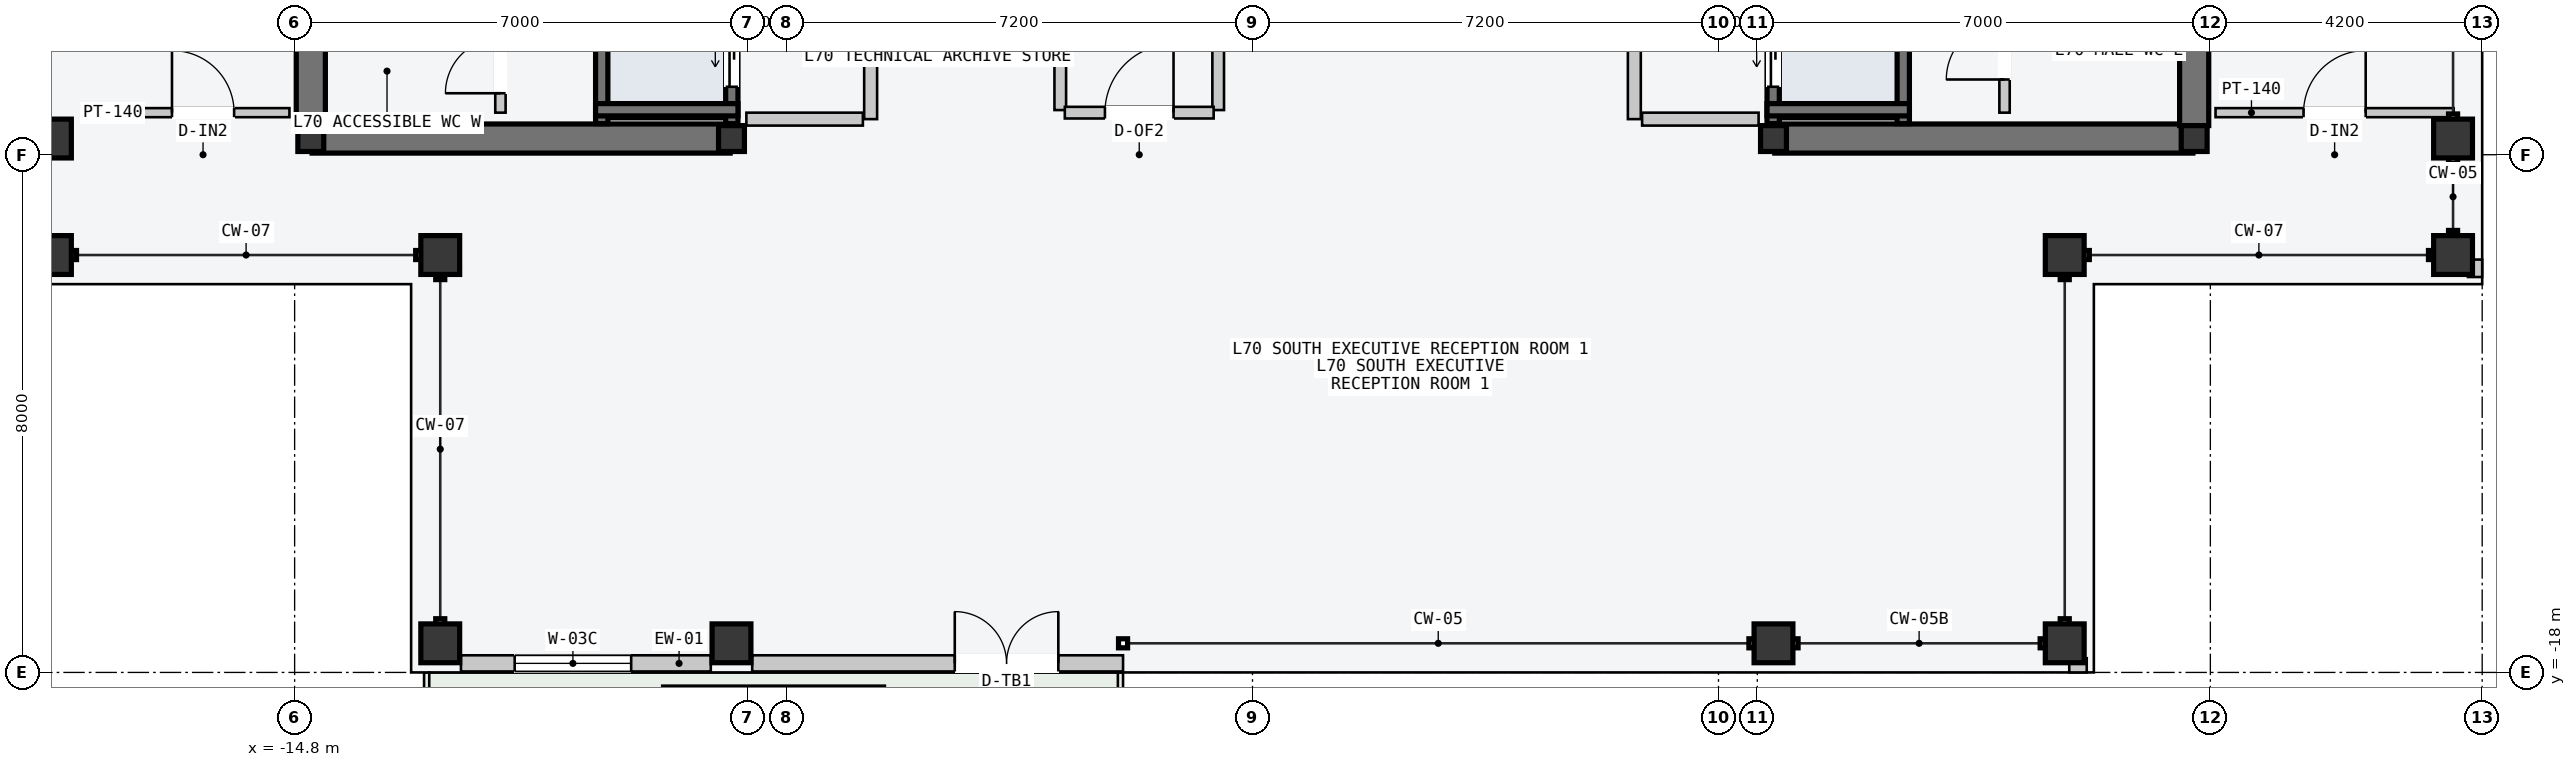
"""IFC4 building model, lengths in metres.
Left out: names, types, materials, properties, quantities, classifications, styles, units other than length and angle.
Written with IfcOpenShell. Run it as: python <this file> out.ifc"""

import sys

from ifc_helpers import new_model, si_unit, direction, frame, frame_2d, origin, origin_2d, place, context, subcontext, project, spatial, rectangle, hollow_rectangle, i_section, extrude, element, fill, save


model = new_model("IFC4")
c1 = context("Model", 3, precision=1e-05, world=origin(), true_north=direction((0.0, 1.0)))
c2 = subcontext(c1, "Body", "Model", "MODEL_VIEW")
j1 = project(units=[si_unit("LENGTHUNIT", "METRE"), si_unit("PLANEANGLEUNIT", "RADIAN")], contexts=[c1])
p1 = place(None, origin())
s1 = spatial("IfcSite", under=j1, at=p1, CompositionType="ELEMENT")
p2 = place(p1, origin())
s2 = spatial("IfcBuilding", under=s1, at=p2, CompositionType="ELEMENT")
p3 = place(p2, frame((0.0, 0.0, 265.2)))
s3 = spatial("IfcBuildingStorey", under=s2, at=p3, CompositionType="ELEMENT", Elevation=265.2)
p4 = place(p3, frame((-14.53, -9.75, -0.2), z_axis=(0.0, 0.0, 1.0), x_axis=(1.0, 0.0, 0.0)))
e1 = element("IfcWall", 1, at=p4, inside=s3, PredefinedType="SHEAR", context=c2, shape_type="SweptSolid", body=[
    extrude(rectangle(XDim=6.46, YDim=0.45, at=frame_2d((3.23, 0.0))), origin(), (0.0, 0.0, 1.0), 3.6),
])
p5 = place(p3, frame((-14.55, -9.55, -0.2), z_axis=(0.0, 0.0, 1.0), x_axis=(0.0, 1.0, 0.0)))
e2 = element("IfcWall", 2, at=p5, inside=s3, PredefinedType="SHEAR", context=c2, shape_type="SweptSolid", body=[
    extrude(rectangle(XDim=9.35, YDim=0.45, at=frame_2d((4.675, 0.0))), origin(), (0.0, 0.0, 1.0), 3.6),
])
p6 = place(p3, frame((8.07, -9.75, -0.2), z_axis=(0.0, 0.0, 1.0), x_axis=(1.0, 0.0, 0.0)))
e3 = element("IfcWall", 3, at=p6, inside=s3, PredefinedType="SHEAR", context=c2, shape_type="SweptSolid", body=[
    extrude(rectangle(XDim=6.46, YDim=0.45, at=frame_2d((3.23, 0.0))), origin(), (0.0, 0.0, 1.0), 3.6),
])
p7 = place(p3, frame((14.55, -9.55, -0.2), z_axis=(0.0, 0.0, 1.0), x_axis=(0.0, 1.0, 0.0)))
e4 = element("IfcWall", 4, at=p7, inside=s3, PredefinedType="SHEAR", context=c2, shape_type="SweptSolid", body=[
    extrude(rectangle(XDim=9.35, YDim=0.45, at=frame_2d((4.675, 0.0))), origin(), (0.0, 0.0, 1.0), 3.6),
])
for number, where, z_axis, x_axis in (
    (5, (-14.55, -9.75, 0.0), (0.0, 0.0, 1.0), (1.0, 0.0, 0.0)),
    (6, (-8.05, -9.75, 0.0), (0.0, 0.0, 1.0), (1.0, 0.0, 0.0)),
    (7, (8.05, -9.75, 0.0), (0.0, 0.0, 1.0), (1.0, 0.0, 0.0)),
    (8, (14.55, -9.75, 0.0), (0.0, 0.0, 1.0), (1.0, 0.0, 0.0)),
):
    element("IfcColumn", number, at=place(p3, frame(where, z_axis=z_axis, x_axis=x_axis)), inside=s3, PredefinedType="COLUMN", context=c2, shape_type="SweptSolid", body=[
        extrude(i_section(OverallWidth=0.4, OverallDepth=0.4, WebThickness=0.013, FlangeThickness=0.021, at=origin_2d()), origin(), (0.0, 0.0, 1.0), 3.6),
    ])
for number, where, z_axis, x_axis in (
    (9, (-12.55, -17.55, 0.0), (0.0, 0.0, 1.0), (1.0, 0.0, 0.0)),
    (10, (-8.05, -17.55, 0.0), (0.0, 0.0, 1.0), (1.0, 0.0, 0.0)),
    (11, (8.05, -17.55, 0.0), (0.0, 0.0, 1.0), (1.0, 0.0, 0.0)),
    (12, (12.55, -17.55, 0.0), (0.0, 0.0, 1.0), (1.0, 0.0, 0.0)),
    (13, (-18.55, -11.55, 0.0), (0.0, 0.0, 1.0), (0.0, 1.0, 0.0)),
    (14, (-18.55, -9.75, 0.0), (0.0, 0.0, 1.0), (0.0, 1.0, 0.0)),
    (15, (18.55, -11.55, 0.0), (0.0, 0.0, 1.0), (0.0, 1.0, 0.0)),
    (16, (18.55, -9.75, 0.0), (0.0, 0.0, 1.0), (0.0, 1.0, 0.0)),
    (17, (12.55, -11.55, 0.0), (0.0, 0.0, 1.0), (1.0, 0.0, 0.0)),
    (18, (-12.55, -11.55, 0.0), (0.0, 0.0, 1.0), (1.0, 0.0, 0.0)),
):
    element("IfcColumn", number, at=place(p3, frame(where, z_axis=z_axis, x_axis=x_axis)), inside=s3, PredefinedType="COLUMN", context=c2, shape_type="SweptSolid", body=[
        extrude(hollow_rectangle(XDim=0.6, YDim=0.6, WallThickness=0.025, at=origin_2d()), origin(), (0.0, 0.0, 1.0), 3.6),
    ])
p8 = place(p3, frame((-12.23, -17.86, 0.0), z_axis=(0.0, 0.0, 1.0), x_axis=(1.0, 0.0, 0.0)))
e19 = element("IfcWall", 19, at=p8, inside=s3, PredefinedType="STANDARD", context=c2, shape_type="SweptSolid", body=[
    extrude(rectangle(XDim=3.86, YDim=0.25, at=frame_2d((1.93, 0.0))), origin(), (0.0, 0.0, 1.0), 3.4),
])
p9 = place(p8, frame((0.83, 0.0, 0.85)))
e20 = element("IfcOpeningElement", 20, at=p9, cuts=e19, PredefinedType="OPENING", context=c2, shape_type="SweptSolid", body=[
    extrude(rectangle(XDim=1.8, YDim=2.05, at=frame_2d((0.9, 1.025))), frame((0.0, 0.135, 0.0), z_axis=(0.0, -1.0, 0.0), x_axis=(1.0, 0.0, 0.0)), (0.0, 0.0, 1.0), 0.27),
])
p10 = place(p3, frame((-7.73, -17.86, 0.0), z_axis=(0.0, 0.0, 1.0), x_axis=(1.0, 0.0, 0.0)))
e21 = element("IfcWall", 21, at=p10, inside=s3, PredefinedType="STANDARD", context=c2, shape_type="SweptSolid", body=[
    extrude(rectangle(XDim=5.73, YDim=0.25, at=frame_2d((2.865, 0.0))), origin(), (0.0, 0.0, 1.0), 3.4),
])
p11 = place(p10, frame((3.13, 0.0, 0.0)))
e22 = element("IfcOpeningElement", 22, at=p11, cuts=e21, PredefinedType="OPENING", context=c2, shape_type="SweptSolid", body=[
    extrude(rectangle(XDim=1.6, YDim=2.2, at=frame_2d((0.8, 1.1))), frame((0.0, 0.135, 0.0), z_axis=(0.0, -1.0, 0.0), x_axis=(1.0, 0.0, 0.0)), (0.0, 0.0, 1.0), 0.27),
])
for number, where, z_axis, x_axis in (
    (23, (12.62, -17.89, 0.0), (0.0, 0.0, 1.0), (1.0, 0.0, 0.0)),
    (24, (18.89, -11.89, 0.0), (0.0, 0.0, 1.0), (0.0, 1.0, 0.0)),
):
    element("IfcWall", number, at=place(p3, frame(where, z_axis=z_axis, x_axis=x_axis)), inside=s3, PredefinedType="PARAPET", context=c2, shape_type="SweptSolid", body=[
        extrude(rectangle(XDim=0.27, YDim=0.22, at=frame_2d((0.135, 0.0))), origin(), (0.0, 0.0, 1.0), 1.2),
    ])
p12 = place(p3, frame((-8.045, -9.52, -0.2), z_axis=(0.0, 0.0, 1.0), x_axis=(0.0, 1.0, 0.0)))
e25 = element("IfcWall", 25, at=p12, inside=s3, PredefinedType="SOLIDWALL", context=c2, shape_type="SweptSolid", body=[
    extrude(rectangle(XDim=2.12, YDim=0.19, at=frame_2d((1.06, 0.0))), origin(), (0.0, 0.0, 1.0), 3.6),
])
p13 = place(p12, frame((0.57, 0.0, 0.2)))
e26 = element("IfcOpeningElement", 26, at=p13, cuts=e25, PredefinedType="OPENING", context=c2, shape_type="SweptSolid", body=[
    extrude(rectangle(XDim=1.1, YDim=2.2, at=frame_2d((0.55, 1.1))), frame((0.0, 0.105, 0.0), z_axis=(0.0, -1.0, 0.0), x_axis=(1.0, 0.0, 0.0)), (0.0, 0.0, 1.0), 0.21),
])
p14 = place(p3, frame((-10.055, -9.52, -0.2), z_axis=(0.0, 0.0, 1.0), x_axis=(0.0, 1.0, 0.0)))
e27 = element("IfcWall", 27, at=p14, inside=s3, PredefinedType="SOLIDWALL", context=c2, shape_type="SweptSolid", body=[
    extrude(rectangle(XDim=2.12, YDim=0.19, at=frame_2d((1.06, 0.0))), origin(), (0.0, 0.0, 1.0), 3.6),
])
p15 = place(p3, frame((-10.15, -9.305, -0.2), z_axis=(0.0, 0.0, 1.0), x_axis=(1.0, 0.0, 0.0)))
e28 = element("IfcWall", 28, at=p15, inside=s3, PredefinedType="SOLIDWALL", context=c2, shape_type="SweptSolid", body=[
    extrude(rectangle(XDim=2.2, YDim=0.19, at=frame_2d((1.1, 0.0))), origin(), (0.0, 0.0, 1.0), 3.6),
])
p16 = place(p3, frame((8.045, -9.52, -0.2), z_axis=(0.0, 0.0, 1.0), x_axis=(0.0, 1.0, 0.0)))
e29 = element("IfcWall", 29, at=p16, inside=s3, PredefinedType="SOLIDWALL", context=c2, shape_type="SweptSolid", body=[
    extrude(rectangle(XDim=2.12, YDim=0.19, at=frame_2d((1.06, 0.0))), origin(), (0.0, 0.0, 1.0), 3.6),
])
p17 = place(p16, frame((0.57, 0.0, 0.2)))
e30 = element("IfcOpeningElement", 30, at=p17, cuts=e29, PredefinedType="OPENING", context=c2, shape_type="SweptSolid", body=[
    extrude(rectangle(XDim=1.1, YDim=2.2, at=frame_2d((0.55, 1.1))), frame((0.0, 0.105, 0.0), z_axis=(0.0, -1.0, 0.0), x_axis=(1.0, 0.0, 0.0)), (0.0, 0.0, 1.0), 0.21),
])
p18 = place(p3, frame((10.055, -9.52, -0.2), z_axis=(0.0, 0.0, 1.0), x_axis=(0.0, 1.0, 0.0)))
e31 = element("IfcWall", 31, at=p18, inside=s3, PredefinedType="SOLIDWALL", context=c2, shape_type="SweptSolid", body=[
    extrude(rectangle(XDim=2.12, YDim=0.19, at=frame_2d((1.06, 0.0))), origin(), (0.0, 0.0, 1.0), 3.6),
])
p19 = place(p3, frame((7.95, -9.305, -0.2), z_axis=(0.0, 0.0, 1.0), x_axis=(1.0, 0.0, 0.0)))
e32 = element("IfcWall", 32, at=p19, inside=s3, PredefinedType="SOLIDWALL", context=c2, shape_type="SweptSolid", body=[
    extrude(rectangle(XDim=2.2, YDim=0.19, at=frame_2d((1.1, 0.0))), origin(), (0.0, 0.0, 1.0), 3.6),
])
p20 = place(p3, frame((-5.9, -9.45, 0.0), z_axis=(0.0, 0.0, 1.0), x_axis=(0.0, 1.0, 0.0)))
e33 = element("IfcWall", 33, at=p20, inside=s3, PredefinedType="PARTITIONING", context=c2, shape_type="SweptSolid", body=[
    extrude(rectangle(XDim=10.5, YDim=0.2, at=frame_2d((5.25, 0.0))), origin(), (0.0, 0.0, 1.0), 3.4),
])
p21 = place(p20, frame((3.9, 0.0, 0.0)))
e34 = element("IfcOpeningElement", 34, at=p21, cuts=e33, PredefinedType="OPENING", context=c2, shape_type="SweptSolid", body=[
    extrude(rectangle(XDim=1.5, YDim=2.2, at=frame_2d((0.75, 1.1))), frame((0.0, 0.11, 0.0), z_axis=(0.0, -1.0, 0.0), x_axis=(1.0, 0.0, 0.0)), (0.0, 0.0, 1.0), 0.22),
])
p22 = place(p3, frame((-6.02, -9.45, 0.0), z_axis=(0.0, 0.0, 1.0), x_axis=(-1.0, 0.0, 0.0)))
e35 = element("IfcWall", 35, at=p22, inside=s3, PredefinedType="PARTITIONING", context=c2, shape_type="SweptSolid", body=[
    extrude(rectangle(XDim=1.8, YDim=0.2, at=frame_2d((0.9, 0.0))), origin(), (0.0, 0.0, 1.0), 3.4),
])
p23 = place(p3, frame((-11.62, -9.35, 0.0), z_axis=(0.0, 0.0, 1.0), x_axis=(0.0, 1.0, 0.0)))
e36 = element("IfcWall", 36, at=p23, inside=s3, PredefinedType="PARTITIONING", context=c2, shape_type="SweptSolid", body=[
    extrude(rectangle(XDim=3.85, YDim=0.16, at=frame_2d((1.925, 0.0))), origin(), (0.0, 0.0, 1.0), 3.4),
])
p24 = place(p23, frame((0.3, 0.0, 0.0)))
e37 = element("IfcOpeningElement", 37, at=p24, cuts=e36, PredefinedType="OPENING", context=c2, shape_type="SweptSolid", body=[
    extrude(rectangle(XDim=0.85, YDim=2.12, at=frame_2d((0.425, 1.06))), frame((0.0, 0.09, 0.0), z_axis=(0.0, -1.0, 0.0), x_axis=(1.0, 0.0, 0.0)), (0.0, 0.0, 1.0), 0.18),
])
p25 = place(p23, frame((1.5, 0.0, 0.0)))
e38 = element("IfcOpeningElement", 38, at=p25, cuts=e36, PredefinedType="OPENING", context=c2, shape_type="SweptSolid", body=[
    extrude(rectangle(XDim=0.85, YDim=2.12, at=frame_2d((0.425, 1.06))), frame((0.0, 0.09, 0.0), z_axis=(0.0, -1.0, 0.0), x_axis=(1.0, 0.0, 0.0)), (0.0, 0.0, 1.0), 0.18),
])
p26 = place(p23, frame((2.7, 0.0, 0.0)))
e39 = element("IfcOpeningElement", 39, at=p26, cuts=e36, PredefinedType="OPENING", context=c2, shape_type="SweptSolid", body=[
    extrude(rectangle(XDim=0.85, YDim=2.12, at=frame_2d((0.425, 1.06))), frame((0.0, 0.09, 0.0), z_axis=(0.0, -1.0, 0.0), x_axis=(1.0, 0.0, 0.0)), (0.0, 0.0, 1.0), 0.18),
])
p27 = place(p3, frame((5.9, -9.45, 0.0), z_axis=(0.0, 0.0, 1.0), x_axis=(0.0, 1.0, 0.0)))
e40 = element("IfcWall", 40, at=p27, inside=s3, PredefinedType="PARTITIONING", context=c2, shape_type="SweptSolid", body=[
    extrude(rectangle(XDim=10.5, YDim=0.2, at=frame_2d((5.25, 0.0))), origin(), (0.0, 0.0, 1.0), 3.4),
])
p28 = place(p27, frame((3.9, 0.0, 0.0)))
e41 = element("IfcOpeningElement", 41, at=p28, cuts=e40, PredefinedType="OPENING", context=c2, shape_type="SweptSolid", body=[
    extrude(rectangle(XDim=1.5, YDim=2.2, at=frame_2d((0.75, 1.1))), frame((0.0, 0.11, 0.0), z_axis=(0.0, -1.0, 0.0), x_axis=(1.0, 0.0, 0.0)), (0.0, 0.0, 1.0), 0.22),
])
p29 = place(p3, frame((6.02, -9.45, 0.0), z_axis=(0.0, 0.0, 1.0), x_axis=(1.0, 0.0, 0.0)))
e42 = element("IfcWall", 42, at=p29, inside=s3, PredefinedType="PARTITIONING", context=c2, shape_type="SweptSolid", body=[
    extrude(rectangle(XDim=1.8, YDim=0.2, at=frame_2d((0.9, 0.0))), origin(), (0.0, 0.0, 1.0), 3.4),
])
p30 = place(p3, frame((11.62, -9.35, 0.0), z_axis=(0.0, 0.0, 1.0), x_axis=(0.0, 1.0, 0.0)))
e43 = element("IfcWall", 43, at=p30, inside=s3, PredefinedType="PARTITIONING", context=c2, shape_type="SweptSolid", body=[
    extrude(rectangle(XDim=3.85, YDim=0.16, at=frame_2d((1.925, 0.0))), origin(), (0.0, 0.0, 1.0), 3.4),
])
p31 = place(p30, frame((0.512, 0.0, 0.0)))
e44 = element("IfcOpeningElement", 44, at=p31, cuts=e43, PredefinedType="OPENING", context=c2, shape_type="SweptSolid", body=[
    extrude(rectangle(XDim=0.9, YDim=2.15, at=frame_2d((0.45, 1.075))), frame((0.0, 0.09, 0.0), z_axis=(0.0, -1.0, 0.0), x_axis=(1.0, 0.0, 0.0)), (0.0, 0.0, 1.0), 0.18),
])
p32 = place(p30, frame((2.438, 0.0, 0.0)))
e45 = element("IfcOpeningElement", 45, at=p32, cuts=e43, PredefinedType="OPENING", context=c2, shape_type="SweptSolid", body=[
    extrude(rectangle(XDim=0.9, YDim=2.15, at=frame_2d((0.45, 1.075))), frame((0.0, 0.09, 0.0), z_axis=(0.0, -1.0, 0.0), x_axis=(1.0, 0.0, 0.0)), (0.0, 0.0, 1.0), 0.18),
])
p33 = place(p3, frame((-2.97, -9.31, 0.0), z_axis=(0.0, 0.0, 1.0), x_axis=(0.0, 1.0, 0.0)))
e46 = element("IfcWall", 46, at=p33, inside=s3, PredefinedType="PARTITIONING", context=c2, shape_type="SweptSolid", body=[
    extrude(rectangle(XDim=3.63, YDim=0.18, at=frame_2d((1.815, 0.0))), origin(), (0.0, 0.0, 1.0), 3.4),
])
p34 = place(p33, frame((1.15, 0.0, 0.0)))
e47 = element("IfcOpeningElement", 47, at=p34, cuts=e46, PredefinedType="OPENING", context=c2, shape_type="SweptSolid", body=[
    extrude(rectangle(XDim=0.96, YDim=2.18, at=frame_2d((0.48, 1.09))), frame((0.0, 0.1, 0.0), z_axis=(0.0, -1.0, 0.0), x_axis=(1.0, 0.0, 0.0)), (0.0, 0.0, 1.0), 0.2),
])
p35 = place(p3, frame((-0.53, -9.31, 0.0), z_axis=(0.0, 0.0, 1.0), x_axis=(0.0, 1.0, 0.0)))
e48 = element("IfcWall", 48, at=p35, inside=s3, PredefinedType="PARTITIONING", context=c2, shape_type="SweptSolid", body=[
    extrude(rectangle(XDim=3.63, YDim=0.18, at=frame_2d((1.815, 0.0))), origin(), (0.0, 0.0, 1.0), 3.4),
])
p36 = place(p35, frame((1.15, 0.0, 0.0)))
e49 = element("IfcOpeningElement", 49, at=p36, cuts=e48, PredefinedType="OPENING", context=c2, shape_type="SweptSolid", body=[
    extrude(rectangle(XDim=0.96, YDim=2.18, at=frame_2d((0.48, 1.09))), frame((0.0, 0.1, 0.0), z_axis=(0.0, -1.0, 0.0), x_axis=(1.0, 0.0, 0.0)), (0.0, 0.0, 1.0), 0.2),
])
p37 = place(p3, frame((-2.9, -9.35, 0.0), z_axis=(0.0, 0.0, 1.0), x_axis=(1.0, 0.0, 0.0)))
e50 = element("IfcWall", 50, at=p37, inside=s3, PredefinedType="PARTITIONING", context=c2, shape_type="SweptSolid", body=[
    extrude(rectangle(XDim=2.3, YDim=0.18, at=frame_2d((1.15, 0.0))), origin(), (0.0, 0.0, 1.0), 3.4),
])
p38 = place(p37, frame((0.62, 0.0, 0.0)))
e51 = element("IfcOpeningElement", 51, at=p38, cuts=e50, PredefinedType="OPENING", context=c2, shape_type="SweptSolid", body=[
    extrude(rectangle(XDim=1.06, YDim=2.2, at=frame_2d((0.53, 1.1))), frame((0.0, 0.1, 0.0), z_axis=(0.0, -1.0, 0.0), x_axis=(1.0, 0.0, 0.0)), (0.0, 0.0, 1.0), 0.2),
])
p39 = place(p3, frame((-17.55, -9.35, 0.0), z_axis=(0.0, 0.0, 1.0), x_axis=(1.0, 0.0, 0.0)))
e52 = element("IfcWall", 52, at=p39, inside=s3, PredefinedType="PARTITIONING", context=c2, shape_type="SweptSolid", body=[
    extrude(rectangle(XDim=2.67, YDim=0.14, at=frame_2d((1.335, 0.0))), origin(), (0.0, 0.0, 1.0), 3.4),
])
p40 = place(p39, frame((0.855, 0.0, 0.0)))
e53 = element("IfcOpeningElement", 53, at=p40, cuts=e52, PredefinedType="OPENING", context=c2, shape_type="SweptSolid", body=[
    extrude(rectangle(XDim=0.96, YDim=2.18, at=frame_2d((0.48, 1.09))), frame((0.0, 0.08, 0.0), z_axis=(0.0, -1.0, 0.0), x_axis=(1.0, 0.0, 0.0)), (0.0, 0.0, 1.0), 0.16),
])
p41 = place(p3, frame((14.88, -9.35, 0.0), z_axis=(0.0, 0.0, 1.0), x_axis=(1.0, 0.0, 0.0)))
e54 = element("IfcWall", 54, at=p41, inside=s3, PredefinedType="PARTITIONING", context=c2, shape_type="SweptSolid", body=[
    extrude(rectangle(XDim=3.68, YDim=0.14, at=frame_2d((1.84, 0.0))), origin(), (0.0, 0.0, 1.0), 3.4),
])
p42 = place(p41, frame((1.36, 0.0, 0.0)))
e55 = element("IfcOpeningElement", 55, at=p42, cuts=e54, PredefinedType="OPENING", context=c2, shape_type="SweptSolid", body=[
    extrude(rectangle(XDim=0.96, YDim=2.18, at=frame_2d((0.48, 1.09))), frame((0.0, 0.08, 0.0), z_axis=(0.0, -1.0, 0.0), x_axis=(1.0, 0.0, 0.0)), (0.0, 0.0, 1.0), 0.16),
])
p43 = place(p9, origin())
e56 = element("IfcWindow", 56, at=p43, inside=s3, PartitioningType="SINGLE_PANEL", PredefinedType="WINDOW", context=c2, shape_type="SweptSolid", body=[
    extrude(rectangle(XDim=1.8, YDim=2.05, at=frame_2d((0.9, 1.025))), frame((0.0, 0.03, 0.0), z_axis=(0.0, -1.0, 0.0), x_axis=(1.0, 0.0, 0.0)), (0.0, 0.0, 1.0), 0.06),
])
fill(e20, e56)
p44 = place(p11, origin())
e57 = element("IfcDoor", 57, at=p44, inside=s3, OperationType="DOUBLE_DOOR_SINGLE_SWING", PredefinedType="DOOR", context=c2, shape_type="SweptSolid", body=[
    extrude(rectangle(XDim=1.6, YDim=2.2, at=frame_2d((0.8, 1.1))), frame((0.0, 0.025, 0.0), z_axis=(0.0, -1.0, 0.0), x_axis=(1.0, 0.0, 0.0)), (0.0, 0.0, 1.0), 0.05),
])
fill(e22, e57)
p45 = place(p13, origin())
e58 = element("IfcDoor", 58, at=p45, inside=s3, OperationType="SLIDING_TO_LEFT", PredefinedType="DOOR", context=c2, shape_type="SweptSolid", body=[
    extrude(rectangle(XDim=1.1, YDim=2.2, at=frame_2d((0.55, 1.1))), frame((0.0, 0.025, 0.0), z_axis=(0.0, -1.0, 0.0), x_axis=(1.0, 0.0, 0.0)), (0.0, 0.0, 1.0), 0.05),
])
fill(e26, e58)
p46 = place(p17, origin())
e59 = element("IfcDoor", 59, at=p46, inside=s3, OperationType="SLIDING_TO_LEFT", PredefinedType="DOOR", context=c2, shape_type="SweptSolid", body=[
    extrude(rectangle(XDim=1.1, YDim=2.2, at=frame_2d((0.55, 1.1))), frame((0.0, 0.025, 0.0), z_axis=(0.0, -1.0, 0.0), x_axis=(1.0, 0.0, 0.0)), (0.0, 0.0, 1.0), 0.05),
])
fill(e30, e59)
p47 = place(p24, origin())
e60 = element("IfcDoor", 60, at=p47, inside=s3, OperationType="SINGLE_SWING_LEFT", PredefinedType="DOOR", context=c2, shape_type="SweptSolid", body=[
    extrude(rectangle(XDim=0.85, YDim=2.12, at=frame_2d((0.425, 1.06))), frame((0.0, 0.025, 0.0), z_axis=(0.0, -1.0, 0.0), x_axis=(1.0, 0.0, 0.0)), (0.0, 0.0, 1.0), 0.05),
])
fill(e37, e60)
p48 = place(p31, origin())
e61 = element("IfcDoor", 61, at=p48, inside=s3, OperationType="SINGLE_SWING_LEFT", PredefinedType="DOOR", context=c2, shape_type="SweptSolid", body=[
    extrude(rectangle(XDim=0.9, YDim=2.15, at=frame_2d((0.45, 1.075))), frame((0.0, 0.025, 0.0), z_axis=(0.0, -1.0, 0.0), x_axis=(1.0, 0.0, 0.0)), (0.0, 0.0, 1.0), 0.05),
])
fill(e44, e61)
p49 = place(p38, origin())
e62 = element("IfcDoor", 62, at=p49, inside=s3, OperationType="SINGLE_SWING_RIGHT", PredefinedType="DOOR", context=c2, shape_type="SweptSolid", body=[
    extrude(rectangle(XDim=1.06, YDim=2.2, at=frame_2d((0.53, 1.1))), frame((0.0, 0.025, 0.0), z_axis=(0.0, -1.0, 0.0), x_axis=(1.0, 0.0, 0.0)), (0.0, 0.0, 1.0), 0.05),
])
fill(e51, e62)
p50 = place(p40, origin())
e63 = element("IfcDoor", 63, at=p50, inside=s3, OperationType="SINGLE_SWING_LEFT", PredefinedType="DOOR", context=c2, shape_type="SweptSolid", body=[
    extrude(rectangle(XDim=0.96, YDim=2.18, at=frame_2d((0.48, 1.09))), frame((0.0, 0.025, 0.0), z_axis=(0.0, -1.0, 0.0), x_axis=(1.0, 0.0, 0.0)), (0.0, 0.0, 1.0), 0.05),
])
fill(e53, e63)
p51 = place(p42, origin())
e64 = element("IfcDoor", 64, at=p51, inside=s3, OperationType="SINGLE_SWING_RIGHT", PredefinedType="DOOR", context=c2, shape_type="SweptSolid", body=[
    extrude(rectangle(XDim=0.96, YDim=2.18, at=frame_2d((0.48, 1.09))), frame((0.0, 0.025, 0.0), z_axis=(0.0, -1.0, 0.0), x_axis=(1.0, 0.0, 0.0)), (0.0, 0.0, 1.0), 0.05),
])
fill(e55, e64)
save(model, sys.argv[1])
